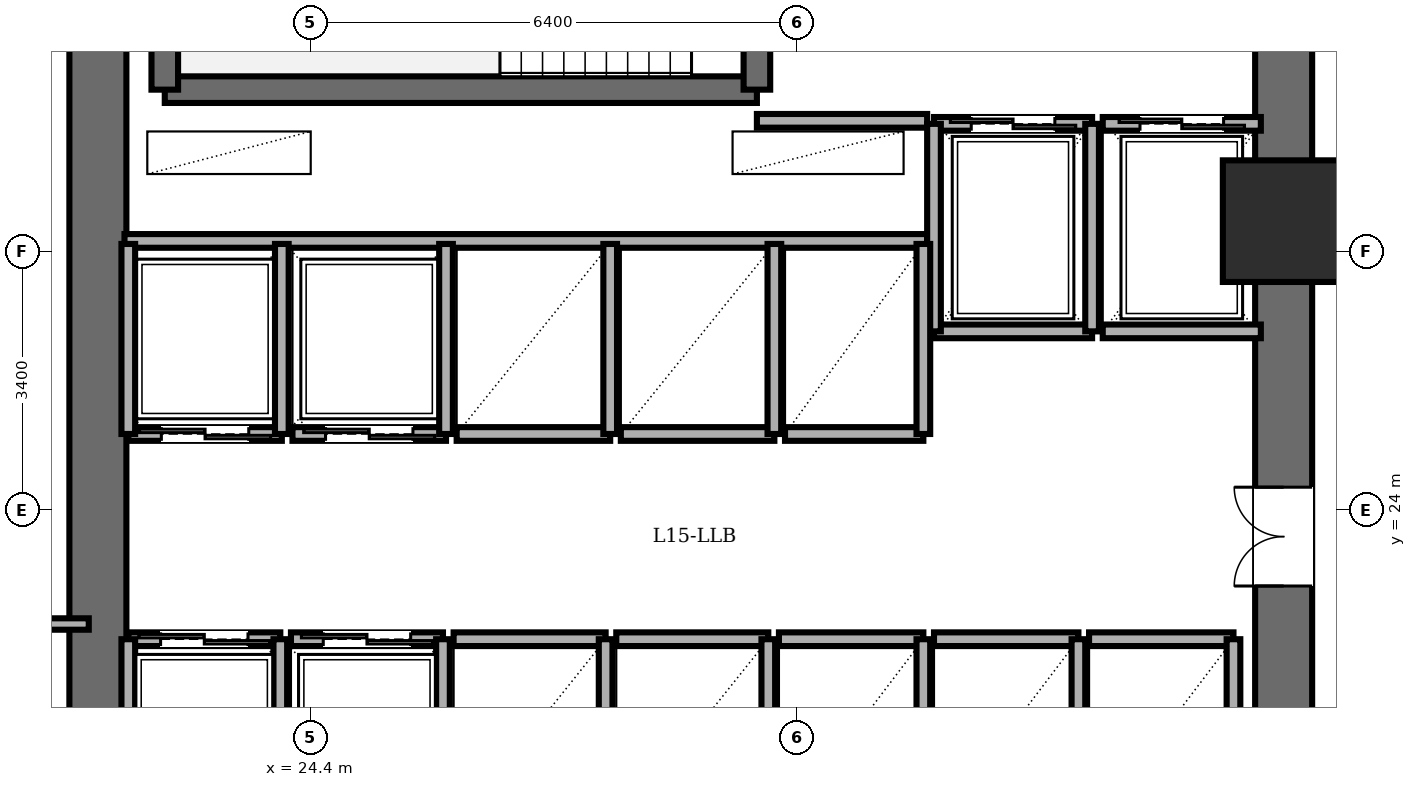
"""IFC4 building model, lengths in metres.
Left out: names, types, materials, properties, quantities, classifications, styles, units other than length and angle.
Written with IfcOpenShell. Run it as: python <this file> out.ifc"""

import sys

from ifc_helpers import new_model, si_unit, direction, frame, frame_2d, origin, origin_2d, place, context, subcontext, project, spatial, rectangle, extrude, element, fill, save


model = new_model("IFC4")
c1 = context("Model", 3, precision=1e-05, world=origin(), true_north=direction((0.0, 1.0)))
c2 = subcontext(c1, "Body", "Model", "MODEL_VIEW")
j1 = project(units=[si_unit("LENGTHUNIT", "METRE"), si_unit("PLANEANGLEUNIT", "RADIAN")], contexts=[c1])
p1 = place(None, origin())
s1 = spatial("IfcSite", under=j1, at=p1, CompositionType="ELEMENT")
p2 = place(p1, origin())
s2 = spatial("IfcBuilding", under=s1, at=p2, CompositionType="ELEMENT")
p3 = place(p2, frame((0.0, 0.0, 57.6)))
s3 = spatial("IfcBuildingStorey", under=s2, at=p3, CompositionType="ELEMENT", Elevation=57.6)
p4 = place(p3, frame((37.2, 27.8, 0.0), z_axis=(0.0, 0.0, 1.0), x_axis=(1.0, 0.0, 0.0)))
e1 = element("IfcColumn", 1, at=p4, inside=s3, PredefinedType="COLUMN", context=c2, shape_type="SweptSolid", body=[
    extrude(rectangle(XDim=1.6, YDim=1.6, at=origin_2d()), origin(), (0.0, 0.0, 1.0), 3.6),
])
p5 = place(p3, frame((21.6, 14.4, 0.0), z_axis=(0.0, 0.0, 1.0), x_axis=(0.0, 1.0, 0.0)))
e2 = element("IfcWall", 2, at=p5, inside=s3, PredefinedType="SHEAR", context=c2, shape_type="SweptSolid", body=[
    extrude(rectangle(XDim=19.2, YDim=0.75, at=frame_2d((9.6, 0.0))), origin(), (0.0, 0.0, 1.0), 3.4),
])
p6 = place(p3, frame((37.2, 14.4, 0.0), z_axis=(0.0, 0.0, 1.0), x_axis=(0.0, 1.0, 0.0)))
e3 = element("IfcWall", 3, at=p6, inside=s3, PredefinedType="SHEAR", context=c2, shape_type="SweptSolid", body=[
    extrude(rectangle(XDim=19.2, YDim=0.75, at=frame_2d((9.6, 0.0))), origin(), (0.0, 0.0, 1.0), 3.4),
])
p7 = place(p6, frame((15.8, 0.0, 0.0)))
e4 = element("IfcOpeningElement", 4, at=p7, cuts=e3, PredefinedType="OPENING", context=c2, shape_type="SweptSolid", body=[
    extrude(rectangle(XDim=1.15, YDim=2.15, at=frame_2d((0.575, 1.075))), frame((0.0, 0.385, 0.0), z_axis=(0.0, -1.0, 0.0), x_axis=(1.0, 0.0, 0.0)), (0.0, 0.0, 1.0), 0.77),
])
p8 = place(p6, frame((3.6, 0.0, 0.0)))
e5 = element("IfcOpeningElement", 5, at=p8, cuts=e3, PredefinedType="OPENING", context=c2, shape_type="SweptSolid", body=[
    extrude(rectangle(XDim=1.1, YDim=2.15, at=frame_2d((0.55, 1.075))), frame((0.0, 0.385, 0.0), z_axis=(0.0, -1.0, 0.0), x_axis=(1.0, 0.0, 0.0)), (0.0, 0.0, 1.0), 0.77),
])
p9 = place(p6, frame((8.6, 0.0, 0.0)))
e6 = element("IfcOpeningElement", 6, at=p9, cuts=e3, PredefinedType="OPENING", context=c2, shape_type="SweptSolid", body=[
    extrude(rectangle(XDim=1.3, YDim=2.2, at=frame_2d((0.65, 1.1))), frame((0.0, 0.385, 0.0), z_axis=(0.0, -1.0, 0.0), x_axis=(1.0, 0.0, 0.0)), (0.0, 0.0, 1.0), 0.77),
])
p10 = place(p3, frame((22.48, 29.53, 0.0), z_axis=(0.0, 0.0, 1.0), x_axis=(1.0, 0.0, 0.0)))
e7 = element("IfcWall", 7, at=p10, inside=s3, PredefinedType="SOLIDWALL", context=c2, shape_type="SweptSolid", body=[
    extrude(rectangle(XDim=7.79, YDim=0.35, at=frame_2d((3.895, 0.0))), origin(), (0.0, 0.0, 1.0), 3.4),
])
p11 = place(p3, frame((22.48, 29.53, 0.0), z_axis=(0.0, 0.0, 1.0), x_axis=(0.0, 1.0, 0.0)))
e8 = element("IfcWall", 8, at=p11, inside=s3, PredefinedType="SOLIDWALL", context=c2, shape_type="SweptSolid", body=[
    extrude(rectangle(XDim=3.58, YDim=0.35, at=frame_2d((1.79, 0.0))), origin(), (0.0, 0.0, 1.0), 3.4),
])
p12 = place(p3, frame((30.27, 29.53, 0.0), z_axis=(0.0, 0.0, 1.0), x_axis=(0.0, 1.0, 0.0)))
e9 = element("IfcWall", 9, at=p12, inside=s3, PredefinedType="SOLIDWALL", context=c2, shape_type="SweptSolid", body=[
    extrude(rectangle(XDim=3.58, YDim=0.35, at=frame_2d((1.79, 0.0))), origin(), (0.0, 0.0, 1.0), 3.4),
])
p13 = place(p12, frame((1.25, 0.0, 0.0)))
e10 = element("IfcOpeningElement", 10, at=p13, cuts=e9, PredefinedType="OPENING", context=c2, shape_type="SweptSolid", body=[
    extrude(rectangle(XDim=1.1, YDim=2.15, at=frame_2d((0.55, 1.075))), frame((0.0, 0.185, 0.0), z_axis=(0.0, -1.0, 0.0), x_axis=(1.0, 0.0, 0.0)), (0.0, 0.0, 1.0), 0.37),
])
p14 = place(p3, frame((30.27, 29.12, 0.0), z_axis=(0.0, 0.0, 1.0), x_axis=(1.0, 0.0, 0.0)))
e11 = element("IfcWall", 11, at=p14, inside=s3, PredefinedType="PARTITIONING", context=c2, shape_type="SweptSolid", body=[
    extrude(rectangle(XDim=2.24, YDim=0.18, at=frame_2d((1.12, 0.0))), origin(), (0.0, 0.0, 1.0), 3.4),
])
p15 = place(p3, frame((21.95, 27.54, 0.0), z_axis=(0.0, 0.0, 1.0), x_axis=(1.0, 0.0, 0.0)))
e12 = element("IfcWall", 12, at=p15, inside=s3, PredefinedType="PARTITIONING", context=c2, shape_type="SweptSolid", body=[
    extrude(rectangle(XDim=10.56, YDim=0.18, at=frame_2d((5.28, 0.0))), origin(), (0.0, 0.0, 1.0), 3.4),
])
p16 = place(p3, frame((32.6, 29.08, 0.0), z_axis=(0.0, 0.0, 1.0), x_axis=(1.0, 0.0, 0.0)))
e13 = element("IfcWall", 13, at=p16, inside=s3, PredefinedType="PARTITIONING", context=c2, shape_type="SweptSolid", body=[
    extrude(rectangle(XDim=2.08, YDim=0.18, at=frame_2d((1.04, 0.0))), origin(), (0.0, 0.0, 1.0), 3.4),
])
p17 = place(p16, frame((0.49, 0.0, 0.0)))
e14 = element("IfcOpeningElement", 14, at=p17, cuts=e13, PredefinedType="OPENING", context=c2, shape_type="SweptSolid", body=[
    extrude(rectangle(XDim=1.1, YDim=2.2, at=frame_2d((0.55, 1.1))), frame((0.0, 0.1, 0.0), z_axis=(0.0, -1.0, 0.0), x_axis=(1.0, 0.0, 0.0)), (0.0, 0.0, 1.0), 0.2),
])
p18 = place(p3, frame((34.68, 26.35, 0.0), z_axis=(0.0, 0.0, 1.0), x_axis=(-1.0, 0.0, 0.0)))
e15 = element("IfcWall", 15, at=p18, inside=s3, PredefinedType="PARTITIONING", context=c2, shape_type="SweptSolid", body=[
    extrude(rectangle(XDim=2.08, YDim=0.18, at=frame_2d((1.04, 0.0))), origin(), (0.0, 0.0, 1.0), 3.4),
])
for number, where, z_axis, x_axis in (
    (16, (34.68, 26.35, 0.0), (0.0, 0.0, 1.0), (0.0, 1.0, 0.0)),
    (17, (32.6, 29.08, 0.0), (0.0, 0.0, 1.0), (0.0, -1.0, 0.0)),
):
    element("IfcWall", number, at=place(p3, frame(where, z_axis=z_axis, x_axis=x_axis)), inside=s3, PredefinedType="PARTITIONING", context=c2, shape_type="SweptSolid", body=[
        extrude(rectangle(XDim=2.73, YDim=0.18, at=frame_2d((1.365, 0.0))), origin(), (0.0, 0.0, 1.0), 3.4),
    ])
p19 = place(p3, frame((34.82, 29.08, 0.0), z_axis=(0.0, 0.0, 1.0), x_axis=(1.0, 0.0, 0.0)))
e18 = element("IfcWall", 18, at=p19, inside=s3, PredefinedType="PARTITIONING", context=c2, shape_type="SweptSolid", body=[
    extrude(rectangle(XDim=2.08, YDim=0.18, at=frame_2d((1.04, 0.0))), origin(), (0.0, 0.0, 1.0), 3.4),
])
p20 = place(p19, frame((0.49, 0.0, 0.0)))
e19 = element("IfcOpeningElement", 19, at=p20, cuts=e18, PredefinedType="OPENING", context=c2, shape_type="SweptSolid", body=[
    extrude(rectangle(XDim=1.1, YDim=2.2, at=frame_2d((0.55, 1.1))), frame((0.0, 0.1, 0.0), z_axis=(0.0, -1.0, 0.0), x_axis=(1.0, 0.0, 0.0)), (0.0, 0.0, 1.0), 0.2),
])
p21 = place(p3, frame((36.9, 26.35, 0.0), z_axis=(0.0, 0.0, 1.0), x_axis=(-1.0, 0.0, 0.0)))
e20 = element("IfcWall", 20, at=p21, inside=s3, PredefinedType="PARTITIONING", context=c2, shape_type="SweptSolid", body=[
    extrude(rectangle(XDim=2.08, YDim=0.18, at=frame_2d((1.04, 0.0))), origin(), (0.0, 0.0, 1.0), 3.4),
])
p22 = place(p3, frame((24.02, 25.0, 0.0), z_axis=(0.0, 0.0, 1.0), x_axis=(-1.0, 0.0, 0.0)))
e21 = element("IfcWall", 21, at=p22, inside=s3, PredefinedType="PARTITIONING", context=c2, shape_type="SweptSolid", body=[
    extrude(rectangle(XDim=2.02, YDim=0.18, at=frame_2d((1.01, 0.0))), origin(), (0.0, 0.0, 1.0), 3.4),
])
p23 = place(p22, frame((0.435, 0.0, 0.0)))
e22 = element("IfcOpeningElement", 22, at=p23, cuts=e21, PredefinedType="OPENING", context=c2, shape_type="SweptSolid", body=[
    extrude(rectangle(XDim=1.15, YDim=2.2, at=frame_2d((0.575, 1.1))), frame((0.0, 0.1, 0.0), z_axis=(0.0, -1.0, 0.0), x_axis=(1.0, 0.0, 0.0)), (0.0, 0.0, 1.0), 0.2),
])
for number, where, z_axis, x_axis in (
    (23, (24.02, 25.0, 0.0), (0.0, 0.0, 1.0), (0.0, 1.0, 0.0)),
    (24, (22.0, 27.5, 0.0), (0.0, 0.0, 1.0), (0.0, -1.0, 0.0)),
):
    element("IfcWall", number, at=place(p3, frame(where, z_axis=z_axis, x_axis=x_axis)), inside=s3, PredefinedType="PARTITIONING", context=c2, shape_type="SweptSolid", body=[
        extrude(rectangle(XDim=2.5, YDim=0.18, at=frame_2d((1.25, 0.0))), origin(), (0.0, 0.0, 1.0), 3.4),
    ])
p24 = place(p3, frame((26.18, 25.0, 0.0), z_axis=(0.0, 0.0, 1.0), x_axis=(-1.0, 0.0, 0.0)))
e25 = element("IfcWall", 25, at=p24, inside=s3, PredefinedType="PARTITIONING", context=c2, shape_type="SweptSolid", body=[
    extrude(rectangle(XDim=2.02, YDim=0.18, at=frame_2d((1.01, 0.0))), origin(), (0.0, 0.0, 1.0), 3.4),
])
p25 = place(p24, frame((0.435, 0.0, 0.0)))
e26 = element("IfcOpeningElement", 26, at=p25, cuts=e25, PredefinedType="OPENING", context=c2, shape_type="SweptSolid", body=[
    extrude(rectangle(XDim=1.15, YDim=2.2, at=frame_2d((0.575, 1.1))), frame((0.0, 0.1, 0.0), z_axis=(0.0, -1.0, 0.0), x_axis=(1.0, 0.0, 0.0)), (0.0, 0.0, 1.0), 0.2),
])
p26 = place(p3, frame((26.18, 25.0, 0.0), z_axis=(0.0, 0.0, 1.0), x_axis=(0.0, 1.0, 0.0)))
e27 = element("IfcWall", 27, at=p26, inside=s3, PredefinedType="PARTITIONING", context=c2, shape_type="SweptSolid", body=[
    extrude(rectangle(XDim=2.5, YDim=0.18, at=frame_2d((1.25, 0.0))), origin(), (0.0, 0.0, 1.0), 3.4),
])
p27 = place(p3, frame((22.0, 22.3, 0.0), z_axis=(0.0, 0.0, 1.0), x_axis=(1.0, 0.0, 0.0)))
e28 = element("IfcWall", 28, at=p27, inside=s3, PredefinedType="PARTITIONING", context=c2, shape_type="SweptSolid", body=[
    extrude(rectangle(XDim=2.0, YDim=0.18, at=frame_2d((1.0, 0.0))), origin(), (0.0, 0.0, 1.0), 3.4),
])
p28 = place(p27, frame((0.425, 0.0, 0.0)))
e29 = element("IfcOpeningElement", 29, at=p28, cuts=e28, PredefinedType="OPENING", context=c2, shape_type="SweptSolid", body=[
    extrude(rectangle(XDim=1.15, YDim=2.2, at=frame_2d((0.575, 1.1))), frame((0.0, 0.1, 0.0), z_axis=(0.0, -1.0, 0.0), x_axis=(1.0, 0.0, 0.0)), (0.0, 0.0, 1.0), 0.2),
])
for number, where, z_axis, x_axis in (
    (30, (24.0, 19.8, 0.0), (0.0, 0.0, 1.0), (0.0, 1.0, 0.0)),
    (31, (22.0, 22.3, 0.0), (0.0, 0.0, 1.0), (0.0, -1.0, 0.0)),
):
    element("IfcWall", number, at=place(p3, frame(where, z_axis=z_axis, x_axis=x_axis)), inside=s3, PredefinedType="PARTITIONING", context=c2, shape_type="SweptSolid", body=[
        extrude(rectangle(XDim=2.5, YDim=0.18, at=frame_2d((1.25, 0.0))), origin(), (0.0, 0.0, 1.0), 3.4),
    ])
p29 = place(p3, frame((24.14, 22.3, 0.0), z_axis=(0.0, 0.0, 1.0), x_axis=(1.0, 0.0, 0.0)))
e32 = element("IfcWall", 32, at=p29, inside=s3, PredefinedType="PARTITIONING", context=c2, shape_type="SweptSolid", body=[
    extrude(rectangle(XDim=2.0, YDim=0.18, at=frame_2d((1.0, 0.0))), origin(), (0.0, 0.0, 1.0), 3.4),
])
p30 = place(p29, frame((0.425, 0.0, 0.0)))
e33 = element("IfcOpeningElement", 33, at=p30, cuts=e32, PredefinedType="OPENING", context=c2, shape_type="SweptSolid", body=[
    extrude(rectangle(XDim=1.15, YDim=2.2, at=frame_2d((0.575, 1.1))), frame((0.0, 0.1, 0.0), z_axis=(0.0, -1.0, 0.0), x_axis=(1.0, 0.0, 0.0)), (0.0, 0.0, 1.0), 0.2),
])
p31 = place(p3, frame((26.14, 19.8, 0.0), z_axis=(0.0, 0.0, 1.0), x_axis=(0.0, 1.0, 0.0)))
e34 = element("IfcWall", 34, at=p31, inside=s3, PredefinedType="PARTITIONING", context=c2, shape_type="SweptSolid", body=[
    extrude(rectangle(XDim=2.5, YDim=0.18, at=frame_2d((1.25, 0.0))), origin(), (0.0, 0.0, 1.0), 3.4),
])
p32 = place(p3, frame((28.34, 25.0, 0.0), z_axis=(0.0, 0.0, 1.0), x_axis=(-1.0, 0.0, 0.0)))
e35 = element("IfcWall", 35, at=p32, inside=s3, PredefinedType="PARTITIONING", context=c2, shape_type="SweptSolid", body=[
    extrude(rectangle(XDim=2.02, YDim=0.18, at=frame_2d((1.01, 0.0))), origin(), (0.0, 0.0, 1.0), 3.4),
])
p33 = place(p3, frame((28.34, 25.0, 0.0), z_axis=(0.0, 0.0, 1.0), x_axis=(0.0, 1.0, 0.0)))
e36 = element("IfcWall", 36, at=p33, inside=s3, PredefinedType="PARTITIONING", context=c2, shape_type="SweptSolid", body=[
    extrude(rectangle(XDim=2.5, YDim=0.18, at=frame_2d((1.25, 0.0))), origin(), (0.0, 0.0, 1.0), 3.4),
])
p34 = place(p3, frame((30.5, 25.0, 0.0), z_axis=(0.0, 0.0, 1.0), x_axis=(-1.0, 0.0, 0.0)))
e37 = element("IfcWall", 37, at=p34, inside=s3, PredefinedType="PARTITIONING", context=c2, shape_type="SweptSolid", body=[
    extrude(rectangle(XDim=2.02, YDim=0.18, at=frame_2d((1.01, 0.0))), origin(), (0.0, 0.0, 1.0), 3.4),
])
p35 = place(p3, frame((30.5, 25.0, 0.0), z_axis=(0.0, 0.0, 1.0), x_axis=(0.0, 1.0, 0.0)))
e38 = element("IfcWall", 38, at=p35, inside=s3, PredefinedType="PARTITIONING", context=c2, shape_type="SweptSolid", body=[
    extrude(rectangle(XDim=2.5, YDim=0.18, at=frame_2d((1.25, 0.0))), origin(), (0.0, 0.0, 1.0), 3.4),
])
p36 = place(p3, frame((26.28, 22.3, 0.0), z_axis=(0.0, 0.0, 1.0), x_axis=(1.0, 0.0, 0.0)))
e39 = element("IfcWall", 39, at=p36, inside=s3, PredefinedType="PARTITIONING", context=c2, shape_type="SweptSolid", body=[
    extrude(rectangle(XDim=2.0, YDim=0.18, at=frame_2d((1.0, 0.0))), origin(), (0.0, 0.0, 1.0), 3.4),
])
p37 = place(p3, frame((28.28, 19.8, 0.0), z_axis=(0.0, 0.0, 1.0), x_axis=(0.0, 1.0, 0.0)))
e40 = element("IfcWall", 40, at=p37, inside=s3, PredefinedType="PARTITIONING", context=c2, shape_type="SweptSolid", body=[
    extrude(rectangle(XDim=2.5, YDim=0.18, at=frame_2d((1.25, 0.0))), origin(), (0.0, 0.0, 1.0), 3.4),
])
p38 = place(p3, frame((28.42, 22.3, 0.0), z_axis=(0.0, 0.0, 1.0), x_axis=(1.0, 0.0, 0.0)))
e41 = element("IfcWall", 41, at=p38, inside=s3, PredefinedType="PARTITIONING", context=c2, shape_type="SweptSolid", body=[
    extrude(rectangle(XDim=2.0, YDim=0.18, at=frame_2d((1.0, 0.0))), origin(), (0.0, 0.0, 1.0), 3.4),
])
p39 = place(p3, frame((30.42, 19.8, 0.0), z_axis=(0.0, 0.0, 1.0), x_axis=(0.0, 1.0, 0.0)))
e42 = element("IfcWall", 42, at=p39, inside=s3, PredefinedType="PARTITIONING", context=c2, shape_type="SweptSolid", body=[
    extrude(rectangle(XDim=2.5, YDim=0.18, at=frame_2d((1.25, 0.0))), origin(), (0.0, 0.0, 1.0), 3.4),
])
p40 = place(p3, frame((32.46, 25.0, 0.0), z_axis=(0.0, 0.0, 1.0), x_axis=(-1.0, 0.0, 0.0)))
e43 = element("IfcWall", 43, at=p40, inside=s3, PredefinedType="PARTITIONING", context=c2, shape_type="SweptSolid", body=[
    extrude(rectangle(XDim=1.82, YDim=0.18, at=frame_2d((0.91, 0.0))), origin(), (0.0, 0.0, 1.0), 3.4),
])
p41 = place(p3, frame((32.46, 25.0, 0.0), z_axis=(0.0, 0.0, 1.0), x_axis=(0.0, 1.0, 0.0)))
e44 = element("IfcWall", 44, at=p41, inside=s3, PredefinedType="PARTITIONING", context=c2, shape_type="SweptSolid", body=[
    extrude(rectangle(XDim=2.5, YDim=0.18, at=frame_2d((1.25, 0.0))), origin(), (0.0, 0.0, 1.0), 3.4),
])
p42 = place(p3, frame((30.56, 22.3, 0.0), z_axis=(0.0, 0.0, 1.0), x_axis=(1.0, 0.0, 0.0)))
e45 = element("IfcWall", 45, at=p42, inside=s3, PredefinedType="PARTITIONING", context=c2, shape_type="SweptSolid", body=[
    extrude(rectangle(XDim=1.9, YDim=0.18, at=frame_2d((0.95, 0.0))), origin(), (0.0, 0.0, 1.0), 3.4),
])
p43 = place(p3, frame((32.46, 19.8, 0.0), z_axis=(0.0, 0.0, 1.0), x_axis=(0.0, 1.0, 0.0)))
e46 = element("IfcWall", 46, at=p43, inside=s3, PredefinedType="PARTITIONING", context=c2, shape_type="SweptSolid", body=[
    extrude(rectangle(XDim=2.5, YDim=0.18, at=frame_2d((1.25, 0.0))), origin(), (0.0, 0.0, 1.0), 3.4),
])
p44 = place(p3, frame((32.6, 22.3, 0.0), z_axis=(0.0, 0.0, 1.0), x_axis=(1.0, 0.0, 0.0)))
e47 = element("IfcWall", 47, at=p44, inside=s3, PredefinedType="PARTITIONING", context=c2, shape_type="SweptSolid", body=[
    extrude(rectangle(XDim=1.9, YDim=0.18, at=frame_2d((0.95, 0.0))), origin(), (0.0, 0.0, 1.0), 3.4),
])
p45 = place(p3, frame((34.5, 19.8, 0.0), z_axis=(0.0, 0.0, 1.0), x_axis=(0.0, 1.0, 0.0)))
e48 = element("IfcWall", 48, at=p45, inside=s3, PredefinedType="PARTITIONING", context=c2, shape_type="SweptSolid", body=[
    extrude(rectangle(XDim=2.5, YDim=0.18, at=frame_2d((1.25, 0.0))), origin(), (0.0, 0.0, 1.0), 3.4),
])
p46 = place(p3, frame((34.64, 22.3, 0.0), z_axis=(0.0, 0.0, 1.0), x_axis=(1.0, 0.0, 0.0)))
e49 = element("IfcWall", 49, at=p46, inside=s3, PredefinedType="PARTITIONING", context=c2, shape_type="SweptSolid", body=[
    extrude(rectangle(XDim=1.9, YDim=0.18, at=frame_2d((0.95, 0.0))), origin(), (0.0, 0.0, 1.0), 3.4),
])
p47 = place(p3, frame((36.54, 19.8, 0.0), z_axis=(0.0, 0.0, 1.0), x_axis=(0.0, 1.0, 0.0)))
e50 = element("IfcWall", 50, at=p47, inside=s3, PredefinedType="PARTITIONING", context=c2, shape_type="SweptSolid", body=[
    extrude(rectangle(XDim=2.5, YDim=0.18, at=frame_2d((1.25, 0.0))), origin(), (0.0, 0.0, 1.0), 3.4),
])
p48 = place(p3, frame((3.4, 22.5, 0.0), z_axis=(0.0, 0.0, 1.0), x_axis=(1.0, 0.0, 0.0)))
e51 = element("IfcWall", 51, at=p48, inside=s3, PredefinedType="PARTITIONING", context=c2, shape_type="SweptSolid", body=[
    extrude(rectangle(XDim=18.08, YDim=0.15, at=frame_2d((9.04, 0.0))), origin(), (0.0, 0.0, 1.0), 3.4),
])
p49 = place(p17, origin())
e52 = element("IfcDoor", 52, at=p49, inside=s3, OperationType="DOUBLE_DOOR_SLIDING", PredefinedType="DOOR", context=c2, shape_type="SweptSolid", body=[
    extrude(rectangle(XDim=1.1, YDim=2.2, at=frame_2d((0.55, 1.1))), frame((0.0, 0.025, 0.0), z_axis=(0.0, -1.0, 0.0), x_axis=(1.0, 0.0, 0.0)), (0.0, 0.0, 1.0), 0.05),
])
fill(e14, e52)
p50 = place(p20, origin())
e53 = element("IfcDoor", 53, at=p50, inside=s3, OperationType="DOUBLE_DOOR_SLIDING", PredefinedType="DOOR", context=c2, shape_type="SweptSolid", body=[
    extrude(rectangle(XDim=1.1, YDim=2.2, at=frame_2d((0.55, 1.1))), frame((0.0, 0.025, 0.0), z_axis=(0.0, -1.0, 0.0), x_axis=(1.0, 0.0, 0.0)), (0.0, 0.0, 1.0), 0.05),
])
fill(e19, e53)
p51 = place(p23, origin())
e54 = element("IfcDoor", 54, at=p51, inside=s3, OperationType="DOUBLE_DOOR_SLIDING", PredefinedType="DOOR", context=c2, shape_type="SweptSolid", body=[
    extrude(rectangle(XDim=1.15, YDim=2.2, at=frame_2d((0.575, 1.1))), frame((0.0, 0.025, 0.0), z_axis=(0.0, -1.0, 0.0), x_axis=(1.0, 0.0, 0.0)), (0.0, 0.0, 1.0), 0.05),
])
fill(e22, e54)
p52 = place(p25, origin())
e55 = element("IfcDoor", 55, at=p52, inside=s3, OperationType="DOUBLE_DOOR_SLIDING", PredefinedType="DOOR", context=c2, shape_type="SweptSolid", body=[
    extrude(rectangle(XDim=1.15, YDim=2.2, at=frame_2d((0.575, 1.1))), frame((0.0, 0.025, 0.0), z_axis=(0.0, -1.0, 0.0), x_axis=(1.0, 0.0, 0.0)), (0.0, 0.0, 1.0), 0.05),
])
fill(e26, e55)
p53 = place(p28, origin())
e56 = element("IfcDoor", 56, at=p53, inside=s3, OperationType="DOUBLE_DOOR_SLIDING", PredefinedType="DOOR", context=c2, shape_type="SweptSolid", body=[
    extrude(rectangle(XDim=1.15, YDim=2.2, at=frame_2d((0.575, 1.1))), frame((0.0, 0.025, 0.0), z_axis=(0.0, -1.0, 0.0), x_axis=(1.0, 0.0, 0.0)), (0.0, 0.0, 1.0), 0.05),
])
fill(e29, e56)
p54 = place(p30, origin())
e57 = element("IfcDoor", 57, at=p54, inside=s3, OperationType="DOUBLE_DOOR_SLIDING", PredefinedType="DOOR", context=c2, shape_type="SweptSolid", body=[
    extrude(rectangle(XDim=1.15, YDim=2.2, at=frame_2d((0.575, 1.1))), frame((0.0, 0.025, 0.0), z_axis=(0.0, -1.0, 0.0), x_axis=(1.0, 0.0, 0.0)), (0.0, 0.0, 1.0), 0.05),
])
fill(e33, e57)
p55 = place(p9, origin())
e58 = element("IfcDoor", 58, at=p55, inside=s3, OperationType="DOUBLE_DOOR_SINGLE_SWING", PredefinedType="DOOR", context=c2, shape_type="SweptSolid", body=[
    extrude(rectangle(XDim=1.3, YDim=2.2, at=frame_2d((0.65, 1.1))), frame((0.0, 0.025, 0.0), z_axis=(0.0, -1.0, 0.0), x_axis=(1.0, 0.0, 0.0)), (0.0, 0.0, 1.0), 0.05),
])
fill(e6, e58)
save(model, sys.argv[1])
